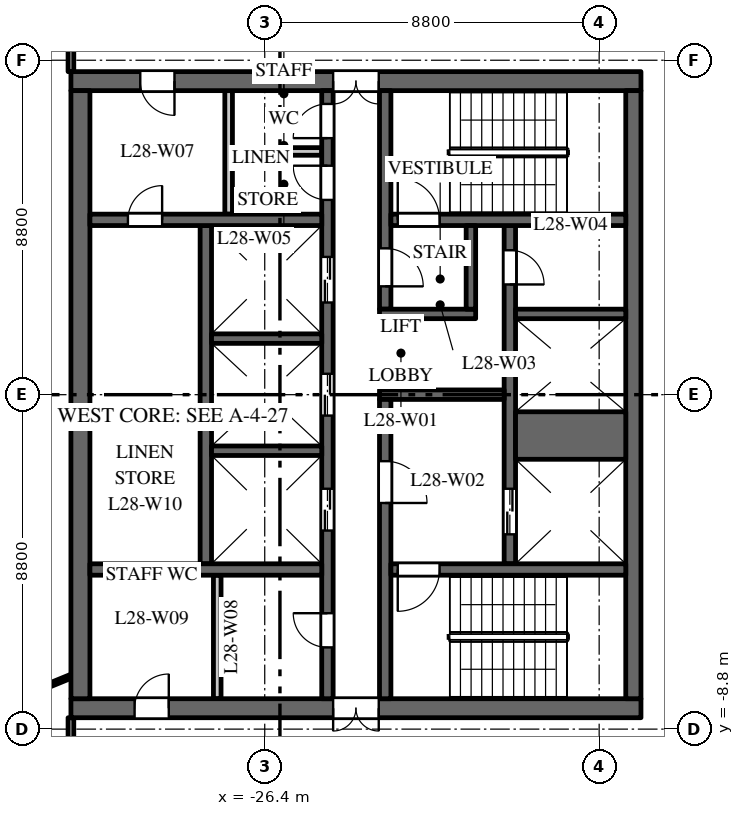
"""IFC4 building model, lengths in metres.
Left out: names, types, materials, properties, quantities, classifications, styles, units other than length and angle.
Written with IfcOpenShell. Run it as: python <this file> out.ifc"""

import sys

from ifc_helpers import new_model, si_unit, direction, frame, frame_2d, origin, place, context, subcontext, project, spatial, rectangle, extrude, element, fill, save


model = new_model("IFC4")
c1 = context("Model", 3, precision=1e-05, world=origin(), true_north=direction((0.0, 1.0)))
c2 = subcontext(c1, "Body", "Model", "MODEL_VIEW")
j1 = project(units=[si_unit("LENGTHUNIT", "METRE"), si_unit("PLANEANGLEUNIT", "RADIAN")], contexts=[c1])
p1 = place(None, origin())
s1 = spatial("IfcSite", under=j1, at=p1, CompositionType="ELEMENT")
p2 = place(p1, origin())
s2 = spatial("IfcBuilding", under=s1, at=p2, CompositionType="ELEMENT")
p3 = place(p2, frame((0.0, 0.0, 124.0)))
s3 = spatial("IfcBuildingStorey", under=s2, at=p3, CompositionType="ELEMENT", Elevation=124.0)
p4 = place(p3, frame((-16.5, 8.25, 0.0), z_axis=(0.0, 0.0, 1.0), x_axis=(-1.0, 0.0, 0.0)))
e1 = element("IfcWall", 1, at=p4, inside=s3, PredefinedType="SHEAR", context=c2, shape_type="SweptSolid", body=[
    extrude(rectangle(XDim=15.0, YDim=0.5, at=frame_2d((7.5, 0.0))), origin(), (0.0, 0.0, 1.0), 3.7),
])
p5 = place(p4, frame((6.9, 0.0, 0.0)))
e2 = element("IfcOpeningElement", 2, at=p5, cuts=e1, PredefinedType="OPENING", context=c2, shape_type="SweptSolid", body=[
    extrude(rectangle(XDim=1.2, YDim=2.1, at=frame_2d((0.6, 1.05))), frame((0.0, 0.26, 0.0), z_axis=(0.0, -1.0, 0.0), x_axis=(1.0, 0.0, 0.0)), (0.0, 0.0, 1.0), 0.52),
])
p6 = place(p4, frame((12.275, 0.0, 0.0)))
e3 = element("IfcOpeningElement", 3, at=p6, cuts=e1, PredefinedType="OPENING", context=c2, shape_type="SweptSolid", body=[
    extrude(rectangle(XDim=0.9, YDim=2.1, at=frame_2d((0.45, 1.05))), frame((0.0, 0.26, 0.0), z_axis=(0.0, -1.0, 0.0), x_axis=(1.0, 0.0, 0.0)), (0.0, 0.0, 1.0), 0.52),
])
p7 = place(p3, frame((-16.5, -8.25, 0.0), z_axis=(0.0, 0.0, 1.0), x_axis=(-1.0, 0.0, 0.0)))
e4 = element("IfcWall", 4, at=p7, inside=s3, PredefinedType="SHEAR", context=c2, shape_type="SweptSolid", body=[
    extrude(rectangle(XDim=15.0, YDim=0.5, at=frame_2d((7.5, 0.0))), origin(), (0.0, 0.0, 1.0), 3.7),
])
p8 = place(p7, frame((6.9, 0.0, 0.0)))
e5 = element("IfcOpeningElement", 5, at=p8, cuts=e4, PredefinedType="OPENING", context=c2, shape_type="SweptSolid", body=[
    extrude(rectangle(XDim=1.2, YDim=2.1, at=frame_2d((0.6, 1.05))), frame((0.0, 0.26, 0.0), z_axis=(0.0, -1.0, 0.0), x_axis=(1.0, 0.0, 0.0)), (0.0, 0.0, 1.0), 0.52),
])
p9 = place(p7, frame((12.425, 0.0, 0.0)))
e6 = element("IfcOpeningElement", 6, at=p9, cuts=e4, PredefinedType="OPENING", context=c2, shape_type="SweptSolid", body=[
    extrude(rectangle(XDim=0.9, YDim=2.1, at=frame_2d((0.45, 1.05))), frame((0.0, 0.26, 0.0), z_axis=(0.0, -1.0, 0.0), x_axis=(1.0, 0.0, 0.0)), (0.0, 0.0, 1.0), 0.52),
])
p10 = place(p3, frame((-27.95, -4.45, 0.0), z_axis=(0.0, 0.0, 1.0), x_axis=(0.0, 1.0, 0.0)))
e7 = element("IfcWall", 7, at=p10, inside=s3, PredefinedType="SHEAR", context=c2, shape_type="SweptSolid", body=[
    extrude(rectangle(XDim=8.9, YDim=0.3, at=frame_2d((4.45, 0.0))), origin(), (0.0, 0.0, 1.0), 3.7),
])
p11 = place(p3, frame((-19.95, -4.45, 0.0), z_axis=(0.0, 0.0, 1.0), x_axis=(0.0, 1.0, 0.0)))
e8 = element("IfcWall", 8, at=p11, inside=s3, PredefinedType="SHEAR", context=c2, shape_type="SweptSolid", body=[
    extrude(rectangle(XDim=8.9, YDim=0.3, at=frame_2d((4.45, 0.0))), origin(), (0.0, 0.0, 1.0), 3.7),
])
p12 = place(p11, frame((0.775, 0.0, 0.0)))
e9 = element("IfcOpeningElement", 9, at=p12, cuts=e8, PredefinedType="OPENING", context=c2, shape_type="SweptSolid", body=[
    extrude(rectangle(XDim=1.2, YDim=2.1, at=frame_2d((0.6, 1.05))), frame((0.0, 0.16, 0.0), z_axis=(0.0, -1.0, 0.0), x_axis=(1.0, 0.0, 0.0)), (0.0, 0.0, 1.0), 0.32),
])
p13 = place(p11, frame((7.35, 0.0, 0.0)))
e10 = element("IfcOpeningElement", 10, at=p13, cuts=e8, PredefinedType="OPENING", context=c2, shape_type="SweptSolid", body=[
    extrude(rectangle(XDim=0.9, YDim=2.1, at=frame_2d((0.45, 1.05))), frame((0.0, 0.16, 0.0), z_axis=(0.0, -1.0, 0.0), x_axis=(1.0, 0.0, 0.0)), (0.0, 0.0, 1.0), 0.32),
])
p14 = place(p3, frame((-24.75, -8.0, 0.0), z_axis=(0.0, 0.0, 1.0), x_axis=(0.0, 1.0, 0.0)))
e11 = element("IfcWall", 11, at=p14, inside=s3, PredefinedType="SHEAR", context=c2, shape_type="SweptSolid", body=[
    extrude(rectangle(XDim=16.0, YDim=0.3, at=frame_2d((8.0, 0.0))), origin(), (0.0, 0.0, 1.0), 3.7),
])
p15 = place(p14, frame((4.425, 0.0, 0.0)))
e12 = element("IfcOpeningElement", 12, at=p15, cuts=e11, PredefinedType="OPENING", context=c2, shape_type="SweptSolid", body=[
    extrude(rectangle(XDim=1.1, YDim=2.1, at=frame_2d((0.55, 1.05))), frame((0.0, 0.16, 0.0), z_axis=(0.0, -1.0, 0.0), x_axis=(1.0, 0.0, 0.0)), (0.0, 0.0, 1.0), 0.32),
])
p16 = place(p14, frame((7.45, 0.0, 0.0)))
e13 = element("IfcOpeningElement", 13, at=p16, cuts=e11, PredefinedType="OPENING", context=c2, shape_type="SweptSolid", body=[
    extrude(rectangle(XDim=1.1, YDim=2.1, at=frame_2d((0.55, 1.05))), frame((0.0, 0.16, 0.0), z_axis=(0.0, -1.0, 0.0), x_axis=(1.0, 0.0, 0.0)), (0.0, 0.0, 1.0), 0.32),
])
p17 = place(p14, frame((10.425, 0.0, 0.0)))
e14 = element("IfcOpeningElement", 14, at=p17, cuts=e11, PredefinedType="OPENING", context=c2, shape_type="SweptSolid", body=[
    extrude(rectangle(XDim=1.2, YDim=2.1, at=frame_2d((0.6, 1.05))), frame((0.0, 0.16, 0.0), z_axis=(0.0, -1.0, 0.0), x_axis=(1.0, 0.0, 0.0)), (0.0, 0.0, 1.0), 0.32),
])
p18 = place(p14, frame((13.125, 0.0, 0.0)))
e15 = element("IfcOpeningElement", 15, at=p18, cuts=e11, PredefinedType="OPENING", context=c2, shape_type="SweptSolid", body=[
    extrude(rectangle(XDim=0.9, YDim=2.1, at=frame_2d((0.45, 1.05))), frame((0.0, 0.16, 0.0), z_axis=(0.0, -1.0, 0.0), x_axis=(1.0, 0.0, 0.0)), (0.0, 0.0, 1.0), 0.32),
])
p19 = place(p14, frame((14.75, 0.0, 0.0)))
e16 = element("IfcOpeningElement", 16, at=p19, cuts=e11, PredefinedType="OPENING", context=c2, shape_type="SweptSolid", body=[
    extrude(rectangle(XDim=0.9, YDim=2.1, at=frame_2d((0.45, 1.05))), frame((0.0, 0.16, 0.0), z_axis=(0.0, -1.0, 0.0), x_axis=(1.0, 0.0, 0.0)), (0.0, 0.0, 1.0), 0.32),
])
p20 = place(p14, frame((1.35, 0.0, 0.0)))
e17 = element("IfcOpeningElement", 17, at=p20, cuts=e11, PredefinedType="OPENING", context=c2, shape_type="SweptSolid", body=[
    extrude(rectangle(XDim=0.9, YDim=2.1, at=frame_2d((0.45, 1.05))), frame((0.0, 0.16, 0.0), z_axis=(0.0, -1.0, 0.0), x_axis=(1.0, 0.0, 0.0)), (0.0, 0.0, 1.0), 0.32),
])
p21 = place(p3, frame((-20.1, 0.0, 0.0), z_axis=(0.0, 0.0, 1.0), x_axis=(-1.0, 0.0, 0.0)))
e18 = element("IfcWall", 18, at=p21, inside=s3, PredefinedType="SHEAR", context=c2, shape_type="SweptSolid", body=[
    extrude(rectangle(XDim=3.28, YDim=0.25, at=frame_2d((1.64, 0.0))), origin(), (0.0, 0.0, 1.0), 3.7),
])
p22 = place(p3, frame((-16.7, -8.0, 0.0), z_axis=(0.0, 0.0, 1.0), x_axis=(0.0, 1.0, 0.0)))
e19 = element("IfcWall", 19, at=p22, inside=s3, PredefinedType="SHEAR", context=c2, shape_type="SweptSolid", body=[
    extrude(rectangle(XDim=16.0, YDim=0.4, at=frame_2d((8.0, 0.0))), origin(), (0.0, 0.0, 1.0), 3.7),
])
p23 = place(p3, frame((-31.25, -8.0, 0.0), z_axis=(0.0, 0.0, 1.0), x_axis=(0.0, 1.0, 0.0)))
e20 = element("IfcWall", 20, at=p23, inside=s3, PredefinedType="SHEAR", context=c2, shape_type="SweptSolid", body=[
    extrude(rectangle(XDim=16.0, YDim=0.5, at=frame_2d((8.0, 0.0))), origin(), (0.0, 0.0, 1.0), 3.7),
])
p24 = place(p3, frame((-24.9, 4.6, 0.0), z_axis=(0.0, 0.0, 1.0), x_axis=(-1.0, 0.0, 0.0)))
e21 = element("IfcWall", 21, at=p24, inside=s3, PredefinedType="SHEAR", context=c2, shape_type="SweptSolid", body=[
    extrude(rectangle(XDim=6.1, YDim=0.3, at=frame_2d((3.05, 0.0))), origin(), (0.0, 0.0, 1.0), 3.7),
])
p25 = place(p24, frame((4.2, 0.0, 0.0)))
e22 = element("IfcOpeningElement", 22, at=p25, cuts=e21, PredefinedType="OPENING", context=c2, shape_type="SweptSolid", body=[
    extrude(rectangle(XDim=0.9, YDim=2.1, at=frame_2d((0.45, 1.05))), frame((0.0, 0.16, 0.0), z_axis=(0.0, -1.0, 0.0), x_axis=(1.0, 0.0, 0.0)), (0.0, 0.0, 1.0), 0.32),
])
for number, where, z_axis, x_axis in (
    (23, (-27.35, 4.75, 0.0), (0.0, 0.0, 1.0), (0.0, 1.0, 0.0)),
    (24, (-27.65, -8.0, 0.0), (0.0, 0.0, 1.0), (0.0, 1.0, 0.0)),
):
    element("IfcWall", number, at=place(p3, frame(where, z_axis=z_axis, x_axis=x_axis)), inside=s3, PredefinedType="PARTITIONING", context=c2, shape_type="SweptSolid", body=[
        extrude(rectangle(XDim=3.25, YDim=0.2, at=frame_2d((1.625, 0.0))), origin(), (0.0, 0.0, 1.0), 3.7),
    ])
p26 = place(p3, frame((-24.9, 6.4, 0.0), z_axis=(0.0, 0.0, 1.0), x_axis=(-1.0, 0.0, 0.0)))
e25 = element("IfcWall", 25, at=p26, inside=s3, PredefinedType="PARTITIONING", context=c2, shape_type="SweptSolid", body=[
    extrude(rectangle(XDim=2.35, YDim=0.2, at=frame_2d((1.175, 0.0))), origin(), (0.0, 0.0, 1.0), 3.7),
])
p27 = place(p3, frame((-24.9, -4.6, 0.0), z_axis=(0.0, 0.0, 1.0), x_axis=(-1.0, 0.0, 0.0)))
e26 = element("IfcWall", 26, at=p27, inside=s3, PredefinedType="SHEAR", context=c2, shape_type="SweptSolid", body=[
    extrude(rectangle(XDim=6.1, YDim=0.3, at=frame_2d((3.05, 0.0))), origin(), (0.0, 0.0, 1.0), 3.7),
])
p28 = place(p3, frame((-16.9, -1.075, 0.0), z_axis=(0.0, 0.0, 1.0), x_axis=(-1.0, 0.0, 0.0)))
e27 = element("IfcWall", 27, at=p28, inside=s3, PredefinedType="SHEAR", context=c2, shape_type="SweptSolid", body=[
    extrude(rectangle(XDim=2.9, YDim=1.25, at=frame_2d((1.45, 0.0))), origin(), (0.0, 0.0, 1.0), 3.7),
])
for number, where, z_axis, x_axis in (
    (28, (-16.9, 2.125, 0.0), (0.0, 0.0, 1.0), (-1.0, 0.0, 0.0)),
    (29, (-24.9, -1.475, 0.0), (0.0, 0.0, 1.0), (-1.0, 0.0, 0.0)),
    (30, (-24.9, 1.475, 0.0), (0.0, 0.0, 1.0), (-1.0, 0.0, 0.0)),
):
    element("IfcWall", number, at=place(p3, frame(where, z_axis=z_axis, x_axis=x_axis)), inside=s3, PredefinedType="SHEAR", context=c2, shape_type="SweptSolid", body=[
        extrude(rectangle(XDim=2.9, YDim=0.25, at=frame_2d((1.45, 0.0))), origin(), (0.0, 0.0, 1.0), 3.7),
    ])
p29 = place(p3, frame((-23.23, 2.25, 0.0), z_axis=(0.0, 0.0, 1.0), x_axis=(0.0, 1.0, 0.0)))
e31 = element("IfcWall", 31, at=p29, inside=s3, PredefinedType="SHEAR", context=c2, shape_type="SweptSolid", body=[
    extrude(rectangle(XDim=5.75, YDim=0.3, at=frame_2d((2.875, 0.0))), origin(), (0.0, 0.0, 1.0), 3.7),
])
p30 = place(p29, frame((0.6, 0.0, 0.0)))
e32 = element("IfcOpeningElement", 32, at=p30, cuts=e31, PredefinedType="OPENING", context=c2, shape_type="SweptSolid", body=[
    extrude(rectangle(XDim=1.0, YDim=2.1, at=frame_2d((0.5, 1.05))), frame((0.0, 0.16, 0.0), z_axis=(0.0, -1.0, 0.0), x_axis=(1.0, 0.0, 0.0)), (0.0, 0.0, 1.0), 0.32),
])
p31 = place(p3, frame((-23.23, -8.0, 0.0), z_axis=(0.0, 0.0, 1.0), x_axis=(0.0, 1.0, 0.0)))
e33 = element("IfcWall", 33, at=p31, inside=s3, PredefinedType="SHEAR", context=c2, shape_type="SweptSolid", body=[
    extrude(rectangle(XDim=7.875, YDim=0.3, at=frame_2d((3.938, 0.0))), origin(), (0.0, 0.0, 1.0), 3.7),
])
p32 = place(p31, frame((5.15, 0.0, 0.0)))
e34 = element("IfcOpeningElement", 34, at=p32, cuts=e33, PredefinedType="OPENING", context=c2, shape_type="SweptSolid", body=[
    extrude(rectangle(XDim=1.1, YDim=2.1, at=frame_2d((0.55, 1.05))), frame((0.0, 0.16, 0.0), z_axis=(0.0, -1.0, 0.0), x_axis=(1.0, 0.0, 0.0)), (0.0, 0.0, 1.0), 0.32),
])
p33 = place(p3, frame((-16.9, 4.6, 0.0), z_axis=(0.0, 0.0, 1.0), x_axis=(-1.0, 0.0, 0.0)))
e35 = element("IfcWall", 35, at=p33, inside=s3, PredefinedType="SHEAR", context=c2, shape_type="SweptSolid", body=[
    extrude(rectangle(XDim=6.18, YDim=0.3, at=frame_2d((3.09, 0.0))), origin(), (0.0, 0.0, 1.0), 3.7),
])
p34 = place(p33, frame((4.9, 0.0, 0.0)))
e36 = element("IfcOpeningElement", 36, at=p34, cuts=e35, PredefinedType="OPENING", context=c2, shape_type="SweptSolid", body=[
    extrude(rectangle(XDim=1.1, YDim=2.1, at=frame_2d((0.55, 1.05))), frame((0.0, 0.16, 0.0), z_axis=(0.0, -1.0, 0.0), x_axis=(1.0, 0.0, 0.0)), (0.0, 0.0, 1.0), 0.32),
])
p35 = place(p3, frame((-16.9, -4.6, 0.0), z_axis=(0.0, 0.0, 1.0), x_axis=(-1.0, 0.0, 0.0)))
e37 = element("IfcWall", 37, at=p35, inside=s3, PredefinedType="SHEAR", context=c2, shape_type="SweptSolid", body=[
    extrude(rectangle(XDim=6.18, YDim=0.3, at=frame_2d((3.09, 0.0))), origin(), (0.0, 0.0, 1.0), 3.7),
])
p36 = place(p35, frame((4.9, 0.0, 0.0)))
e38 = element("IfcOpeningElement", 38, at=p36, cuts=e37, PredefinedType="OPENING", context=c2, shape_type="SweptSolid", body=[
    extrude(rectangle(XDim=1.1, YDim=2.1, at=frame_2d((0.55, 1.05))), frame((0.0, 0.16, 0.0), z_axis=(0.0, -1.0, 0.0), x_axis=(1.0, 0.0, 0.0)), (0.0, 0.0, 1.0), 0.32),
])
p37 = place(p3, frame((-20.85, 2.125, 0.0), z_axis=(0.0, 0.0, 1.0), x_axis=(-1.0, 0.0, 0.0)))
e39 = element("IfcWall", 39, at=p37, inside=s3, PredefinedType="SHEAR", context=c2, shape_type="SweptSolid", body=[
    extrude(rectangle(XDim=2.53, YDim=0.25, at=frame_2d((1.265, 0.0))), origin(), (0.0, 0.0, 1.0), 3.7),
])
p38 = place(p3, frame((-20.975, 2.25, 0.0), z_axis=(0.0, 0.0, 1.0), x_axis=(0.0, 1.0, 0.0)))
e40 = element("IfcWall", 40, at=p38, inside=s3, PredefinedType="SHEAR", context=c2, shape_type="SweptSolid", body=[
    extrude(rectangle(XDim=2.2, YDim=0.25, at=frame_2d((1.1, 0.0))), origin(), (0.0, 0.0, 1.0), 3.7),
])
p39 = place(p3, frame((-34.234, -8.53, 0.0), z_axis=(0.0, 0.0, 1.0), x_axis=(0.925344112436, 0.379128307542, 0.0)))
e41 = element("IfcWall", 41, at=p39, inside=s3, PredefinedType="PARTITIONING", context=c2, shape_type="SweptSolid", body=[
    extrude(rectangle(XDim=2.954, YDim=0.1, at=frame_2d((1.477, 0.0))), origin(), (0.0, 0.0, 1.0), 2.9),
])
for number, where, z_axis, x_axis in (
    (42, (-31.5, -10.7, 0.0), (0.0, 0.0, 1.0), (0.0, 1.0, 0.0)),
    (43, (-31.5, 8.5, 0.0), (0.0, 0.0, 1.0), (0.0, 1.0, 0.0)),
):
    element("IfcWall", number, at=place(p3, frame(where, z_axis=z_axis, x_axis=x_axis)), inside=s3, PredefinedType="PARTITIONING", context=c2, shape_type="SweptSolid", body=[
        extrude(rectangle(XDim=2.2, YDim=0.15, at=frame_2d((1.1, 0.0))), origin(), (0.0, 0.0, 1.0), 3.7),
    ])
p40 = place(p12, origin())
e44 = element("IfcDoor", 44, at=p40, inside=s3, OperationType="DOUBLE_DOOR_SLIDING", PredefinedType="DOOR", context=c2, shape_type="SweptSolid", body=[
    extrude(rectangle(XDim=1.2, YDim=2.1, at=frame_2d((0.6, 1.05))), frame((0.0, 0.025, 0.0), z_axis=(0.0, -1.0, 0.0), x_axis=(1.0, 0.0, 0.0)), (0.0, 0.0, 1.0), 0.05),
])
fill(e9, e44)
p41 = place(p15, origin())
e45 = element("IfcDoor", 45, at=p41, inside=s3, OperationType="DOUBLE_DOOR_SLIDING", PredefinedType="DOOR", context=c2, shape_type="SweptSolid", body=[
    extrude(rectangle(XDim=1.1, YDim=2.1, at=frame_2d((0.55, 1.05))), frame((0.0, 0.025, 0.0), z_axis=(0.0, -1.0, 0.0), x_axis=(1.0, 0.0, 0.0)), (0.0, 0.0, 1.0), 0.05),
])
fill(e12, e45)
p42 = place(p16, origin())
e46 = element("IfcDoor", 46, at=p42, inside=s3, OperationType="DOUBLE_DOOR_SLIDING", PredefinedType="DOOR", context=c2, shape_type="SweptSolid", body=[
    extrude(rectangle(XDim=1.1, YDim=2.1, at=frame_2d((0.55, 1.05))), frame((0.0, 0.025, 0.0), z_axis=(0.0, -1.0, 0.0), x_axis=(1.0, 0.0, 0.0)), (0.0, 0.0, 1.0), 0.05),
])
fill(e13, e46)
p43 = place(p17, origin())
e47 = element("IfcDoor", 47, at=p43, inside=s3, OperationType="DOUBLE_DOOR_SLIDING", PredefinedType="DOOR", context=c2, shape_type="SweptSolid", body=[
    extrude(rectangle(XDim=1.2, YDim=2.1, at=frame_2d((0.6, 1.05))), frame((0.0, 0.025, 0.0), z_axis=(0.0, -1.0, 0.0), x_axis=(1.0, 0.0, 0.0)), (0.0, 0.0, 1.0), 0.05),
])
fill(e14, e47)
p44 = place(p34, origin())
e48 = element("IfcDoor", 48, at=p44, inside=s3, OperationType="SINGLE_SWING_RIGHT", PredefinedType="DOOR", context=c2, shape_type="SweptSolid", body=[
    extrude(rectangle(XDim=1.1, YDim=2.1, at=frame_2d((0.55, 1.05))), frame((0.0, 0.025, 0.0), z_axis=(0.0, -1.0, 0.0), x_axis=(1.0, 0.0, 0.0)), (0.0, 0.0, 1.0), 0.05),
])
fill(e36, e48)
p45 = place(p36, origin())
e49 = element("IfcDoor", 49, at=p45, inside=s3, OperationType="SINGLE_SWING_LEFT", PredefinedType="DOOR", context=c2, shape_type="SweptSolid", body=[
    extrude(rectangle(XDim=1.1, YDim=2.1, at=frame_2d((0.55, 1.05))), frame((0.0, 0.025, 0.0), z_axis=(0.0, -1.0, 0.0), x_axis=(1.0, 0.0, 0.0)), (0.0, 0.0, 1.0), 0.05),
])
fill(e38, e49)
p46 = place(p32, origin())
e50 = element("IfcDoor", 50, at=p46, inside=s3, OperationType="SINGLE_SWING_LEFT", PredefinedType="DOOR", context=c2, shape_type="SweptSolid", body=[
    extrude(rectangle(XDim=1.1, YDim=2.1, at=frame_2d((0.55, 1.05))), frame((0.0, 0.025, 0.0), z_axis=(0.0, -1.0, 0.0), x_axis=(1.0, 0.0, 0.0)), (0.0, 0.0, 1.0), 0.05),
])
fill(e34, e50)
p47 = place(p30, origin())
e51 = element("IfcDoor", 51, at=p47, inside=s3, OperationType="SINGLE_SWING_LEFT", PredefinedType="DOOR", context=c2, shape_type="SweptSolid", body=[
    extrude(rectangle(XDim=1.0, YDim=2.1, at=frame_2d((0.5, 1.05))), frame((0.0, 0.025, 0.0), z_axis=(0.0, -1.0, 0.0), x_axis=(1.0, 0.0, 0.0)), (0.0, 0.0, 1.0), 0.05),
])
fill(e32, e51)
p48 = place(p5, origin())
e52 = element("IfcDoor", 52, at=p48, inside=s3, OperationType="DOUBLE_DOOR_DOUBLE_SWING", PredefinedType="DOOR", context=c2, shape_type="SweptSolid", body=[
    extrude(rectangle(XDim=1.2, YDim=2.1, at=frame_2d((0.6, 1.05))), frame((0.0, 0.025, 0.0), z_axis=(0.0, -1.0, 0.0), x_axis=(1.0, 0.0, 0.0)), (0.0, 0.0, 1.0), 0.05),
])
fill(e2, e52)
p49 = place(p8, origin())
e53 = element("IfcDoor", 53, at=p49, inside=s3, OperationType="DOUBLE_DOOR_DOUBLE_SWING", PredefinedType="DOOR", context=c2, shape_type="SweptSolid", body=[
    extrude(rectangle(XDim=1.2, YDim=2.1, at=frame_2d((0.6, 1.05))), frame((0.0, 0.025, 0.0), z_axis=(0.0, -1.0, 0.0), x_axis=(1.0, 0.0, 0.0)), (0.0, 0.0, 1.0), 0.05),
])
fill(e5, e53)
p50 = place(p13, origin())
e54 = element("IfcDoor", 54, at=p50, inside=s3, OperationType="SINGLE_SWING_LEFT", PredefinedType="DOOR", context=c2, shape_type="SweptSolid", body=[
    extrude(rectangle(XDim=0.9, YDim=2.1, at=frame_2d((0.45, 1.05))), frame((0.0, 0.025, 0.0), z_axis=(0.0, -1.0, 0.0), x_axis=(1.0, 0.0, 0.0)), (0.0, 0.0, 1.0), 0.05),
])
fill(e10, e54)
p51 = place(p18, origin())
e55 = element("IfcDoor", 55, at=p51, inside=s3, OperationType="SINGLE_SWING_LEFT", PredefinedType="DOOR", context=c2, shape_type="SweptSolid", body=[
    extrude(rectangle(XDim=0.9, YDim=2.1, at=frame_2d((0.45, 1.05))), frame((0.0, 0.025, 0.0), z_axis=(0.0, -1.0, 0.0), x_axis=(1.0, 0.0, 0.0)), (0.0, 0.0, 1.0), 0.05),
])
fill(e15, e55)
p52 = place(p19, origin())
e56 = element("IfcDoor", 56, at=p52, inside=s3, OperationType="SINGLE_SWING_RIGHT", PredefinedType="DOOR", context=c2, shape_type="SweptSolid", body=[
    extrude(rectangle(XDim=0.9, YDim=2.1, at=frame_2d((0.45, 1.05))), frame((0.0, 0.025, 0.0), z_axis=(0.0, -1.0, 0.0), x_axis=(1.0, 0.0, 0.0)), (0.0, 0.0, 1.0), 0.05),
])
fill(e16, e56)
p53 = place(p6, origin())
e57 = element("IfcDoor", 57, at=p53, inside=s3, OperationType="SINGLE_SWING_RIGHT", PredefinedType="DOOR", context=c2, shape_type="SweptSolid", body=[
    extrude(rectangle(XDim=0.9, YDim=2.1, at=frame_2d((0.45, 1.05))), frame((0.0, 0.025, 0.0), z_axis=(0.0, -1.0, 0.0), x_axis=(1.0, 0.0, 0.0)), (0.0, 0.0, 1.0), 0.05),
])
fill(e3, e57)
p54 = place(p20, origin())
e58 = element("IfcDoor", 58, at=p54, inside=s3, OperationType="SINGLE_SWING_LEFT", PredefinedType="DOOR", context=c2, shape_type="SweptSolid", body=[
    extrude(rectangle(XDim=0.9, YDim=2.1, at=frame_2d((0.45, 1.05))), frame((0.0, 0.025, 0.0), z_axis=(0.0, -1.0, 0.0), x_axis=(1.0, 0.0, 0.0)), (0.0, 0.0, 1.0), 0.05),
])
fill(e17, e58)
p55 = place(p9, origin())
e59 = element("IfcDoor", 59, at=p55, inside=s3, OperationType="SINGLE_SWING_LEFT", PredefinedType="DOOR", context=c2, shape_type="SweptSolid", body=[
    extrude(rectangle(XDim=0.9, YDim=2.1, at=frame_2d((0.45, 1.05))), frame((0.0, 0.025, 0.0), z_axis=(0.0, -1.0, 0.0), x_axis=(1.0, 0.0, 0.0)), (0.0, 0.0, 1.0), 0.05),
])
fill(e6, e59)
p56 = place(p25, origin())
e60 = element("IfcDoor", 60, at=p56, inside=s3, OperationType="SINGLE_SWING_LEFT", PredefinedType="DOOR", context=c2, shape_type="SweptSolid", body=[
    extrude(rectangle(XDim=0.9, YDim=2.1, at=frame_2d((0.45, 1.05))), frame((0.0, 0.025, 0.0), z_axis=(0.0, -1.0, 0.0), x_axis=(1.0, 0.0, 0.0)), (0.0, 0.0, 1.0), 0.05),
])
fill(e22, e60)
save(model, sys.argv[1])
